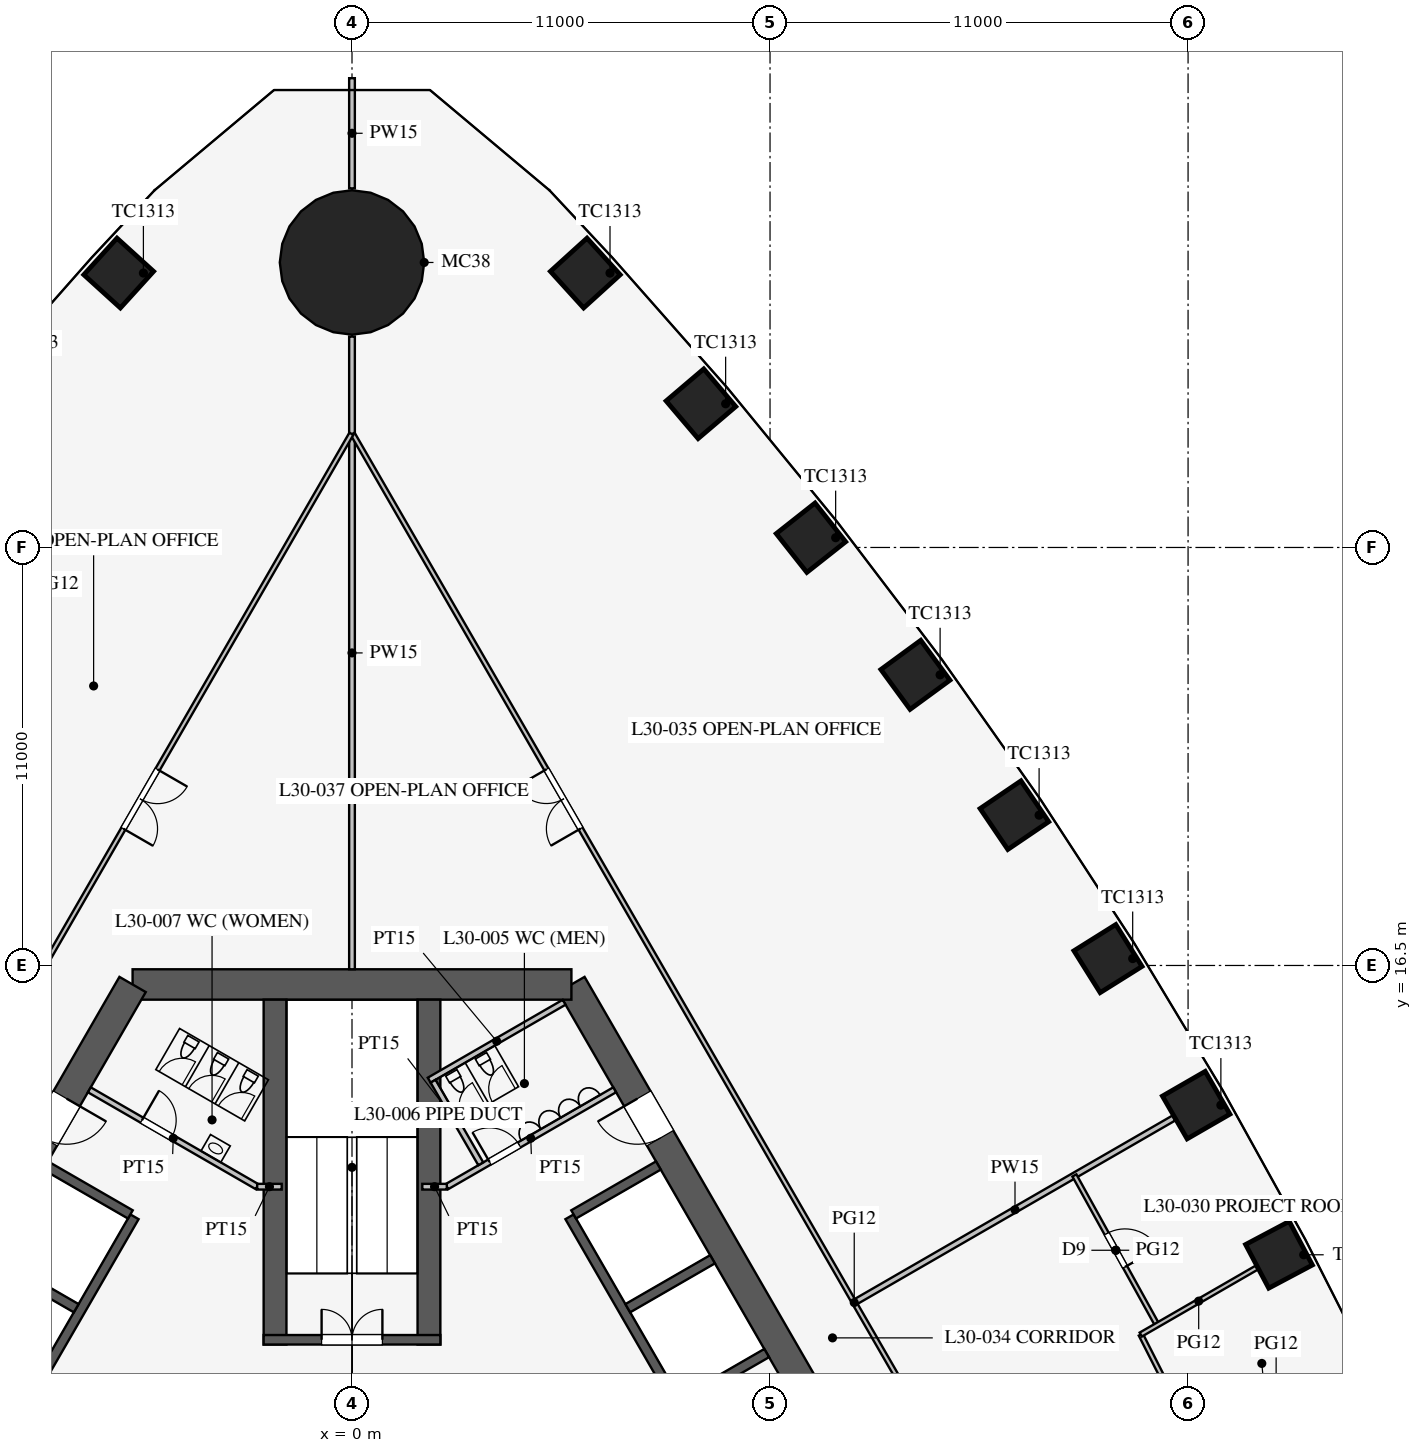
"""IFC4 building model, lengths in metres.
Left out: names, types, materials, properties, quantities, classifications, styles, units other than length and angle.
Written with IfcOpenShell. Run it as: python <this file> out.ifc"""

import sys

from ifc_helpers import new_model, si_unit, direction, frame, frame_2d, origin, origin_2d, place, context, subcontext, project, spatial, rectangle, circle, extrude, element, fill, save


model = new_model("IFC4")
c1 = context("Model", 3, precision=1e-05, world=origin(), true_north=direction((0.0, 1.0)))
c2 = subcontext(c1, "Body", "Model", "MODEL_VIEW")
j1 = project(units=[si_unit("LENGTHUNIT", "METRE"), si_unit("PLANEANGLEUNIT", "RADIAN")], contexts=[c1])
p1 = place(None, origin())
s1 = spatial("IfcSite", under=j1, at=p1, CompositionType="ELEMENT")
p2 = place(p1, origin())
s2 = spatial("IfcBuilding", under=s1, at=p2, CompositionType="ELEMENT")
p3 = place(p2, frame((0.0, 0.0, 132.5)))
s3 = spatial("IfcBuildingStorey", under=s2, at=p3, CompositionType="ELEMENT", Elevation=132.5)
for number, where, z_axis, x_axis in (
    (1, (24.393, 8.887, 0.0), (0.0, 0.0, 1.0), (-0.468, 0.883, 0.0)),
    (2, (22.213, 12.825, 0.0), (0.0, 0.0, 1.0), (-0.5, 0.866, 0.0)),
    (3, (19.893, 16.681, 0.0), (0.0, 0.0, 1.0), (-0.531, 0.847, 0.0)),
    (4, (17.43, 20.456, 0.0), (0.0, 0.0, 1.0), (-0.561, 0.828, 0.0)),
    (5, (14.825, 24.148, 0.0), (0.0, 0.0, 1.0), (-0.591, 0.807, 0.0)),
    (6, (12.077, 27.757, 0.0), (0.0, 0.0, 1.0), (-0.62, 0.785, 0.0)),
    (7, (9.182, 31.282, 0.0), (0.0, 0.0, 1.0), (-0.648, 0.762, 0.0)),
    (8, (6.139, 34.721, 0.0), (0.0, 0.0, 1.0), (-0.672, 0.74, 0.0)),
    (9, (-6.139, 34.721, 0.0), (0.0, 0.0, 1.0), (-0.672, -0.74, 0.0)),
):
    element("IfcColumn", number, at=place(p3, frame(where, z_axis=z_axis, x_axis=x_axis)), inside=s3, PredefinedType="COLUMN", context=c2, shape_type="SweptSolid", body=[
        extrude(rectangle(XDim=1.3, YDim=1.3, at=origin_2d()), origin(), (0.0, 0.0, 1.0), 4.2),
    ])
p4 = place(p3, frame((0.0, 35.0, 0.0), z_axis=(0.0, 0.0, 1.0), x_axis=(1.0, 0.0, 0.0)))
e10 = element("IfcColumn", 10, at=p4, inside=s3, PredefinedType="COLUMN", context=c2, shape_type="SweptSolid", body=[
    extrude(circle(Radius=1.9, at=origin_2d()), origin(), (0.0, 0.0, 1.0), 4.2),
])
p5 = place(p3, frame((16.743, -3.0, 0.0), z_axis=(0.0, 0.0, 1.0), x_axis=(-0.500002442456, 0.866023993627, 0.0)))
e11 = element("IfcWall", 11, at=p5, inside=s3, PredefinedType="SHEAR", context=c2, shape_type="SweptSolid", body=[
    extrude(rectangle(XDim=21.939, YDim=0.8, at=frame_2d((10.97, 0.0))), origin(), (0.0, 0.0, 1.0), 4.2),
])
p6 = place(p5, frame((17.27, 0.0, 0.0)))
e12 = element("IfcOpeningElement", 12, at=p6, cuts=e11, PredefinedType="OPENING", context=c2, shape_type="SweptSolid", body=[
    extrude(rectangle(XDim=1.2, YDim=2.1, at=frame_2d((0.6, 1.05))), frame((0.0, 0.41, 0.0), z_axis=(0.0, -1.0, 0.0), x_axis=(1.0, 0.0, 0.0)), (0.0, 0.0, 1.0), 0.82),
])
p7 = place(p5, frame((3.47, 0.0, 0.0)))
e13 = element("IfcOpeningElement", 13, at=p7, cuts=e11, PredefinedType="OPENING", context=c2, shape_type="SweptSolid", body=[
    extrude(rectangle(XDim=1.2, YDim=2.1, at=frame_2d((0.6, 1.05))), frame((0.0, 0.41, 0.0), z_axis=(0.0, -1.0, 0.0), x_axis=(1.0, 0.0, 0.0)), (0.0, 0.0, 1.0), 0.82),
])
p8 = place(p3, frame((5.773, 16.0, 0.0), z_axis=(0.0, 0.0, 1.0), x_axis=(-1.0, 0.0, 0.0)))
e14 = element("IfcWall", 14, at=p8, inside=s3, PredefinedType="SHEAR", context=c2, shape_type="SweptSolid", body=[
    extrude(rectangle(XDim=11.547, YDim=0.8, at=frame_2d((5.773, 0.0))), origin(), (0.0, 0.0, 1.0), 4.2),
])
p9 = place(p3, frame((-5.773, 16.0, 0.0), z_axis=(0.0, 0.0, 1.0), x_axis=(-0.500002442456, -0.866023993627, 0.0)))
e15 = element("IfcWall", 15, at=p9, inside=s3, PredefinedType="SHEAR", context=c2, shape_type="SweptSolid", body=[
    extrude(rectangle(XDim=21.939, YDim=0.8, at=frame_2d((10.97, 0.0))), origin(), (0.0, 0.0, 1.0), 4.2),
])
p10 = place(p9, frame((17.27, 0.0, 0.0)))
e16 = element("IfcOpeningElement", 16, at=p10, cuts=e15, PredefinedType="OPENING", context=c2, shape_type="SweptSolid", body=[
    extrude(rectangle(XDim=1.2, YDim=2.1, at=frame_2d((0.6, 1.05))), frame((0.0, 0.41, 0.0), z_axis=(0.0, -1.0, 0.0), x_axis=(1.0, 0.0, 0.0)), (0.0, 0.0, 1.0), 0.82),
])
p11 = place(p9, frame((3.47, 0.0, 0.0)))
e17 = element("IfcOpeningElement", 17, at=p11, cuts=e15, PredefinedType="OPENING", context=c2, shape_type="SweptSolid", body=[
    extrude(rectangle(XDim=1.2, YDim=2.1, at=frame_2d((0.6, 1.05))), frame((0.0, 0.41, 0.0), z_axis=(0.0, -1.0, 0.0), x_axis=(1.0, 0.0, 0.0)), (0.0, 0.0, 1.0), 0.82),
])
p12 = place(p3, frame((11.424, 0.014, 0.0), z_axis=(0.0, 0.0, 1.0), x_axis=(-0.500001763848, 0.866024385424, 0.0)))
e18 = element("IfcWall", 18, at=p12, inside=s3, PredefinedType="SHEAR", context=c2, shape_type="SweptSolid", body=[
    extrude(rectangle(XDim=11.4, YDim=0.25, at=frame_2d((5.7, 0.0))), origin(), (0.0, 0.0, 1.0), 4.2),
])
p13 = place(p12, frame((0.975, 0.0, 0.0)))
e19 = element("IfcOpeningElement", 19, at=p13, cuts=e18, PredefinedType="OPENING", context=c2, shape_type="SweptSolid", body=[
    extrude(rectangle(XDim=0.9, YDim=2.1, at=frame_2d((0.45, 1.05))), frame((0.0, 0.135, 0.0), z_axis=(0.0, -1.0, 0.0), x_axis=(1.0, 0.0, 0.0)), (0.0, 0.0, 1.0), 0.27),
])
p14 = place(p12, frame((3.825, 0.0, 0.0)))
e20 = element("IfcOpeningElement", 20, at=p14, cuts=e18, PredefinedType="OPENING", context=c2, shape_type="SweptSolid", body=[
    extrude(rectangle(XDim=0.9, YDim=2.1, at=frame_2d((0.45, 1.05))), frame((0.0, 0.135, 0.0), z_axis=(0.0, -1.0, 0.0), x_axis=(1.0, 0.0, 0.0)), (0.0, 0.0, 1.0), 0.27),
])
for number, where, z_axis, x_axis in (
    (21, (8.682, 5.012, 0.0), (0.0, 0.0, 1.0), (0.866, 0.5, 0.0)),
    (22, (7.257, 7.481, 0.0), (0.0, 0.0, 1.0), (0.866, 0.5, 0.0)),
):
    element("IfcWall", number, at=place(p3, frame(where, z_axis=z_axis, x_axis=x_axis)), inside=s3, PredefinedType="SHEAR", context=c2, shape_type="SweptSolid", body=[
        extrude(rectangle(XDim=2.575, YDim=0.25, at=frame_2d((1.288, 0.0))), origin(), (0.0, 0.0, 1.0), 4.2),
    ])
p15 = place(p3, frame((5.832, 9.949, 0.0), z_axis=(0.0, 0.0, 1.0), x_axis=(0.866029291668, 0.499993265928, 0.0)))
e23 = element("IfcWall", 23, at=p15, inside=s3, PredefinedType="SHEAR", context=c2, shape_type="SweptSolid", body=[
    extrude(rectangle(XDim=2.575, YDim=0.25, at=frame_2d((1.288, 0.0))), origin(), (0.0, 0.0, 1.0), 4.2),
])
p16 = place(p3, frame((-5.724, 9.886, 0.0), z_axis=(0.0, 0.0, 1.0), x_axis=(-0.500001763848, -0.866024385424, 0.0)))
e24 = element("IfcWall", 24, at=p16, inside=s3, PredefinedType="SHEAR", context=c2, shape_type="SweptSolid", body=[
    extrude(rectangle(XDim=11.4, YDim=0.25, at=frame_2d((5.7, 0.0))), origin(), (0.0, 0.0, 1.0), 4.2),
])
p17 = place(p16, frame((6.525, 0.0, 0.0)))
e25 = element("IfcOpeningElement", 25, at=p17, cuts=e24, PredefinedType="OPENING", context=c2, shape_type="SweptSolid", body=[
    extrude(rectangle(XDim=1.2, YDim=2.2, at=frame_2d((0.6, 1.1))), frame((0.0, 0.135, 0.0), z_axis=(0.0, -1.0, 0.0), x_axis=(1.0, 0.0, 0.0)), (0.0, 0.0, 1.0), 0.27),
])
p18 = place(p16, frame((9.375, 0.0, 0.0)))
e26 = element("IfcOpeningElement", 26, at=p18, cuts=e24, PredefinedType="OPENING", context=c2, shape_type="SweptSolid", body=[
    extrude(rectangle(XDim=1.2, YDim=2.2, at=frame_2d((0.6, 1.1))), frame((0.0, 0.135, 0.0), z_axis=(0.0, -1.0, 0.0), x_axis=(1.0, 0.0, 0.0)), (0.0, 0.0, 1.0), 0.27),
])
p19 = place(p3, frame((-5.832, 9.949, 0.0), z_axis=(0.0, 0.0, 1.0), x_axis=(-0.866029291668, 0.499993265928, 0.0)))
e27 = element("IfcWall", 27, at=p19, inside=s3, PredefinedType="SHEAR", context=c2, shape_type="SweptSolid", body=[
    extrude(rectangle(XDim=2.575, YDim=0.25, at=frame_2d((1.288, 0.0))), origin(), (0.0, 0.0, 1.0), 4.2),
])
p20 = place(p3, frame((-7.257, 7.481, 0.0), z_axis=(0.0, 0.0, 1.0), x_axis=(-0.866046643894, 0.499963209246, 0.0)))
e28 = element("IfcWall", 28, at=p20, inside=s3, PredefinedType="SHEAR", context=c2, shape_type="SweptSolid", body=[
    extrude(rectangle(XDim=2.575, YDim=0.25, at=frame_2d((1.288, 0.0))), origin(), (0.0, 0.0, 1.0), 4.2),
])
for number, where, z_axis, x_axis in (
    (29, (2.025, 6.525, 0.0), (0.0, 0.0, 1.0), (0.0, 1.0, 0.0)),
    (30, (-2.025, 6.525, 0.0), (0.0, 0.0, 1.0), (0.0, 1.0, 0.0)),
):
    element("IfcWall", number, at=place(p3, frame(where, z_axis=z_axis, x_axis=x_axis)), inside=s3, PredefinedType="SHEAR", context=c2, shape_type="SweptSolid", body=[
        extrude(rectangle(XDim=9.075, YDim=0.6, at=frame_2d((4.538, 0.0))), origin(), (0.0, 0.0, 1.0), 4.2),
    ])
p21 = place(p3, frame((2.325, 6.65, 0.0), z_axis=(0.0, 0.0, 1.0), x_axis=(-1.0, 0.0, 0.0)))
e31 = element("IfcWall", 31, at=p21, inside=s3, PredefinedType="SHEAR", context=c2, shape_type="SweptSolid", body=[
    extrude(rectangle(XDim=4.65, YDim=0.25, at=frame_2d((2.325, 0.0))), origin(), (0.0, 0.0, 1.0), 4.2),
])
p22 = place(p21, frame((1.525, 0.0, 0.0)))
e32 = element("IfcOpeningElement", 32, at=p22, cuts=e31, PredefinedType="OPENING", context=c2, shape_type="SweptSolid", body=[
    extrude(rectangle(XDim=1.6, YDim=2.1, at=frame_2d((0.8, 1.05))), frame((0.0, 0.135, 0.0), z_axis=(0.0, -1.0, 0.0), x_axis=(1.0, 0.0, 0.0)), (0.0, 0.0, 1.0), 0.27),
])
p23 = place(p3, frame((2.495, 10.678, 0.0), z_axis=(0.0, 0.0, 1.0), x_axis=(0.86602216432, 0.500005610874, 0.0)))
e33 = element("IfcWall", 33, at=p23, inside=s3, PredefinedType="PARTITIONING", context=c2, shape_type="SweptSolid", body=[
    extrude(rectangle(XDim=5.1, YDim=0.15, at=frame_2d((2.55, 0.0))), origin(), (0.0, 0.0, 1.0), 4.0),
])
p24 = place(p23, frame((1.3, 0.0, 0.0)))
e34 = element("IfcOpeningElement", 34, at=p24, cuts=e33, PredefinedType="OPENING", context=c2, shape_type="SweptSolid", body=[
    extrude(rectangle(XDim=0.9, YDim=2.1, at=frame_2d((0.45, 1.05))), frame((0.0, 0.085, 0.0), z_axis=(0.0, -1.0, 0.0), x_axis=(1.0, 0.0, 0.0)), (0.0, 0.0, 1.0), 0.17),
])
p25 = place(p3, frame((-2.495, 10.678, 0.0), z_axis=(0.0, 0.0, 1.0), x_axis=(-0.86602216432, 0.500005610874, 0.0)))
e35 = element("IfcWall", 35, at=p25, inside=s3, PredefinedType="PARTITIONING", context=c2, shape_type="SweptSolid", body=[
    extrude(rectangle(XDim=5.1, YDim=0.15, at=frame_2d((2.55, 0.0))), origin(), (0.0, 0.0, 1.0), 4.0),
])
p26 = place(p25, frame((2.6, 0.0, 0.0)))
e36 = element("IfcOpeningElement", 36, at=p26, cuts=e35, PredefinedType="OPENING", context=c2, shape_type="SweptSolid", body=[
    extrude(rectangle(XDim=0.9, YDim=2.1, at=frame_2d((0.45, 1.05))), frame((0.0, 0.085, 0.0), z_axis=(0.0, -1.0, 0.0), x_axis=(1.0, 0.0, 0.0)), (0.0, 0.0, 1.0), 0.17),
])
for number, where, z_axis, x_axis in (
    (37, (2.495, 10.678, 0.0), (0.0, 0.0, 1.0), (-1.0, 0.0, 0.0)),
    (38, (-2.495, 10.678, 0.0), (0.0, 0.0, 1.0), (1.0, 0.0, 0.0)),
):
    element("IfcWall", number, at=place(p3, frame(where, z_axis=z_axis, x_axis=x_axis)), inside=s3, PredefinedType="PARTITIONING", context=c2, shape_type="SweptSolid", body=[
        extrude(rectangle(XDim=0.645, YDim=0.15, at=frame_2d((0.323, 0.0))), origin(), (0.0, 0.0, 1.0), 4.0),
    ])
p27 = place(p3, frame((2.031, 13.482, 0.0), z_axis=(0.0, 0.0, 1.0), x_axis=(0.866050731258, 0.499956128963, 0.0)))
e39 = element("IfcWall", 39, at=p27, inside=s3, PredefinedType="PARTITIONING", context=c2, shape_type="SweptSolid", body=[
    extrude(rectangle(XDim=4.1, YDim=0.15, at=frame_2d((2.05, 0.0))), origin(), (0.0, 0.0, 1.0), 4.0),
])
p28 = place(p3, frame((3.389, 11.281, 0.0), z_axis=(0.0, 0.0, 1.0), x_axis=(-0.499989096993, 0.866031698547, 0.0)))
e40 = element("IfcWall", 40, at=p28, inside=s3, PredefinedType="PARTITIONING", context=c2, shape_type="SweptSolid", body=[
    extrude(rectangle(XDim=2.51, YDim=0.15, at=frame_2d((1.255, 0.0))), origin(), (0.0, 0.0, 1.0), 4.0),
])
p29 = place(p3, frame((0.0, 16.4, 0.0), z_axis=(0.0, 0.0, 1.0), x_axis=(0.0, 1.0, 0.0)))
e41 = element("IfcWall", 41, at=p29, inside=s3, PredefinedType="PARTITIONING", context=c2, shape_type="SweptSolid", body=[
    extrude(rectangle(XDim=16.65, YDim=0.15, at=frame_2d((8.325, 0.0))), origin(), (0.0, 0.0, 1.0), 2.3),
])
p30 = place(p3, frame((0.0, 36.95, 0.0), z_axis=(0.0, 0.0, 1.0), x_axis=(0.0, 1.0, 0.0)))
e42 = element("IfcWall", 42, at=p30, inside=s3, PredefinedType="PARTITIONING", context=c2, shape_type="SweptSolid", body=[
    extrude(rectangle(XDim=2.899, YDim=0.15, at=frame_2d((1.45, 0.0))), origin(), (0.0, 0.0, 1.0), 2.3),
])
p31 = place(p3, frame((13.268, 7.66, 0.0), z_axis=(0.0, 0.0, 1.0), x_axis=(0.866015788683, 0.500016653474, 0.0)))
e43 = element("IfcWall", 43, at=p31, inside=s3, PredefinedType="PARTITIONING", context=c2, shape_type="SweptSolid", body=[
    extrude(rectangle(XDim=9.65, YDim=0.15, at=frame_2d((4.825, 0.0))), origin(), (0.0, 0.0, 1.0), 3.2),
])
p32 = place(p3, frame((26.415, -15.231, 0.0), z_axis=(0.0, 0.0, 1.0), x_axis=(-0.50000091641, 0.866024874695, 0.0)))
e44 = element("IfcWall", 44, at=p32, inside=s3, PredefinedType="PARTITIONING", context=c2, shape_type="SweptSolid", body=[
    extrude(rectangle(XDim=52.796, YDim=0.12, at=frame_2d((26.398, 0.0))), origin(), (0.0, 0.0, 1.0), 2.9),
])
p33 = place(p32, frame((10.2, 0.0, 0.15)))
e45 = element("IfcOpeningElement", 45, at=p33, cuts=e44, PredefinedType="OPENING", context=c2, shape_type="SweptSolid", body=[
    extrude(rectangle(XDim=1.8, YDim=2.1, at=frame_2d((0.9, 1.05))), frame((0.0, 0.07, 0.0), z_axis=(0.0, -1.0, 0.0), x_axis=(1.0, 0.0, 0.0)), (0.0, 0.0, 1.0), 0.14),
])
p34 = place(p32, frame((40.8, 0.0, 0.15)))
e46 = element("IfcOpeningElement", 46, at=p34, cuts=e44, PredefinedType="OPENING", context=c2, shape_type="SweptSolid", body=[
    extrude(rectangle(XDim=1.8, YDim=2.1, at=frame_2d((0.9, 1.05))), frame((0.0, 0.07, 0.0), z_axis=(0.0, -1.0, 0.0), x_axis=(1.0, 0.0, 0.0)), (0.0, 0.0, 1.0), 0.14),
])
p35 = place(p3, frame((21.189, 7.037, 0.0), z_axis=(0.0, 0.0, 1.0), x_axis=(-0.484292898211, 0.874905931368, 0.0)))
e47 = element("IfcWall", 47, at=p35, inside=s3, PredefinedType="PARTITIONING", context=c2, shape_type="SweptSolid", body=[
    extrude(rectangle(XDim=4.501, YDim=0.12, at=frame_2d((2.25, 0.0))), origin(), (0.0, 0.0, 1.0), 2.9),
])
p36 = place(p35, frame((1.75, 0.0, 0.15)))
e48 = element("IfcOpeningElement", 48, at=p36, cuts=e47, PredefinedType="OPENING", context=c2, shape_type="SweptSolid", body=[
    extrude(rectangle(XDim=1.0, YDim=2.1, at=frame_2d((0.5, 1.05))), frame((0.0, 0.07, 0.0), z_axis=(0.0, -1.0, 0.0), x_axis=(1.0, 0.0, 0.0)), (0.0, 0.0, 1.0), 0.14),
])
p37 = place(p3, frame((22.795, 2.768, 0.0), z_axis=(0.0, 0.0, 1.0), x_axis=(-0.452471679136, 0.891778772779, 0.0)))
e49 = element("IfcWall", 49, at=p37, inside=s3, PredefinedType="PARTITIONING", context=c2, shape_type="SweptSolid", body=[
    extrude(rectangle(XDim=4.507, YDim=0.12, at=frame_2d((2.253, 0.0))), origin(), (0.0, 0.0, 1.0), 2.9),
])
p38 = place(p37, frame((1.75, 0.0, 0.15)))
e50 = element("IfcOpeningElement", 50, at=p38, cuts=e49, PredefinedType="OPENING", context=c2, shape_type="SweptSolid", body=[
    extrude(rectangle(XDim=1.0, YDim=2.1, at=frame_2d((0.5, 1.05))), frame((0.0, 0.07, 0.0), z_axis=(0.0, -1.0, 0.0), x_axis=(1.0, 0.0, 0.0)), (0.0, 0.0, 1.0), 0.14),
])
p39 = place(p3, frame((20.756, 6.787, 0.0), z_axis=(0.0, 0.0, 1.0), x_axis=(0.866027308682, 0.499996700606, 0.0)))
e51 = element("IfcWall", 51, at=p39, inside=s3, PredefinedType="PARTITIONING", context=c2, shape_type="SweptSolid", body=[
    extrude(rectangle(XDim=3.519, YDim=0.12, at=frame_2d((1.76, 0.0))), origin(), (0.0, 0.0, 1.0), 2.9),
])
p40 = place(p3, frame((-0.016, 30.491, 0.0), z_axis=(0.0, 0.0, 1.0), x_axis=(-0.50000091641, -0.866024874695, 0.0)))
e52 = element("IfcWall", 52, at=p40, inside=s3, PredefinedType="PARTITIONING", context=c2, shape_type="SweptSolid", body=[
    extrude(rectangle(XDim=52.796, YDim=0.12, at=frame_2d((26.398, 0.0))), origin(), (0.0, 0.0, 1.0), 2.9),
])
p41 = place(p40, frame((10.2, 0.0, 0.15)))
e53 = element("IfcOpeningElement", 53, at=p41, cuts=e52, PredefinedType="OPENING", context=c2, shape_type="SweptSolid", body=[
    extrude(rectangle(XDim=1.8, YDim=2.1, at=frame_2d((0.9, 1.05))), frame((0.0, 0.07, 0.0), z_axis=(0.0, -1.0, 0.0), x_axis=(1.0, 0.0, 0.0)), (0.0, 0.0, 1.0), 0.14),
])
p42 = place(p40, frame((40.8, 0.0, 0.15)))
e54 = element("IfcOpeningElement", 54, at=p42, cuts=e52, PredefinedType="OPENING", context=c2, shape_type="SweptSolid", body=[
    extrude(rectangle(XDim=1.8, YDim=2.1, at=frame_2d((0.9, 1.05))), frame((0.0, 0.07, 0.0), z_axis=(0.0, -1.0, 0.0), x_axis=(1.0, 0.0, 0.0)), (0.0, 0.0, 1.0), 0.14),
])
p43 = place(p24, origin())
e55 = element("IfcDoor", 55, at=p43, inside=s3, OperationType="SINGLE_SWING_LEFT", PredefinedType="DOOR", context=c2, shape_type="SweptSolid", body=[
    extrude(rectangle(XDim=0.9, YDim=2.1, at=frame_2d((0.45, 1.05))), frame((0.0, 0.025, 0.0), z_axis=(0.0, -1.0, 0.0), x_axis=(1.0, 0.0, 0.0)), (0.0, 0.0, 1.0), 0.05),
])
fill(e34, e55)
p44 = place(p26, frame((0.9, 0.0, 0.0), z_axis=(0.0, 0.0, 1.0), x_axis=(-1.0, 0.0, 0.0)))
e56 = element("IfcDoor", 56, at=p44, inside=s3, OperationType="SINGLE_SWING_LEFT", PredefinedType="DOOR", context=c2, shape_type="SweptSolid", body=[
    extrude(rectangle(XDim=0.9, YDim=2.1, at=frame_2d((0.45, 1.05))), frame((0.0, 0.025, 0.0), z_axis=(0.0, -1.0, 0.0), x_axis=(1.0, 0.0, 0.0)), (0.0, 0.0, 1.0), 0.05),
])
fill(e36, e56)
p45 = place(p22, frame((1.6, 0.0, 0.0), z_axis=(0.0, 0.0, 1.0), x_axis=(-1.0, 0.0, 0.0)))
e57 = element("IfcDoor", 57, at=p45, inside=s3, OperationType="DOUBLE_DOOR_SINGLE_SWING", PredefinedType="DOOR", context=c2, shape_type="SweptSolid", body=[
    extrude(rectangle(XDim=1.6, YDim=2.1, at=frame_2d((0.8, 1.05))), frame((0.0, 0.025, 0.0), z_axis=(0.0, -1.0, 0.0), x_axis=(1.0, 0.0, 0.0)), (0.0, 0.0, 1.0), 0.05),
])
fill(e32, e57)
p46 = place(p6, origin())
e58 = element("IfcDoor", 58, at=p46, inside=s3, OperationType="SINGLE_SWING_RIGHT", PredefinedType="DOOR", context=c2, shape_type="SweptSolid", body=[
    extrude(rectangle(XDim=1.2, YDim=2.1, at=frame_2d((0.6, 1.05))), frame((0.0, 0.025, 0.0), z_axis=(0.0, -1.0, 0.0), x_axis=(1.0, 0.0, 0.0)), (0.0, 0.0, 1.0), 0.05),
])
fill(e12, e58)
p47 = place(p11, origin())
e59 = element("IfcDoor", 59, at=p47, inside=s3, OperationType="SINGLE_SWING_LEFT", PredefinedType="DOOR", context=c2, shape_type="SweptSolid", body=[
    extrude(rectangle(XDim=1.2, YDim=2.1, at=frame_2d((0.6, 1.05))), frame((0.0, 0.025, 0.0), z_axis=(0.0, -1.0, 0.0), x_axis=(1.0, 0.0, 0.0)), (0.0, 0.0, 1.0), 0.05),
])
fill(e17, e59)
p48 = place(p36, frame((1.0, 0.0, 0.0), z_axis=(0.0, 0.0, 1.0), x_axis=(-1.0, 0.0, 0.0)))
e60 = element("IfcDoor", 60, at=p48, inside=s3, OperationType="SINGLE_SWING_RIGHT", PredefinedType="DOOR", context=c2, shape_type="SweptSolid", body=[
    extrude(rectangle(XDim=1.0, YDim=2.1, at=frame_2d((0.5, 1.05))), frame((0.0, 0.025, 0.0), z_axis=(0.0, -1.0, 0.0), x_axis=(1.0, 0.0, 0.0)), (0.0, 0.0, 1.0), 0.05),
])
fill(e48, e60)
p49 = place(p34, origin())
e61 = element("IfcDoor", 61, at=p49, inside=s3, OperationType="DOUBLE_DOOR_SINGLE_SWING", PredefinedType="DOOR", context=c2, shape_type="SweptSolid", body=[
    extrude(rectangle(XDim=1.8, YDim=2.1, at=frame_2d((0.9, 1.05))), frame((0.0, 0.025, 0.0), z_axis=(0.0, -1.0, 0.0), x_axis=(1.0, 0.0, 0.0)), (0.0, 0.0, 1.0), 0.05),
])
fill(e46, e61)
p50 = place(p41, origin())
e62 = element("IfcDoor", 62, at=p50, inside=s3, OperationType="DOUBLE_DOOR_SINGLE_SWING", PredefinedType="DOOR", context=c2, shape_type="SweptSolid", body=[
    extrude(rectangle(XDim=1.8, YDim=2.1, at=frame_2d((0.9, 1.05))), frame((0.0, 0.025, 0.0), z_axis=(0.0, -1.0, 0.0), x_axis=(1.0, 0.0, 0.0)), (0.0, 0.0, 1.0), 0.05),
])
fill(e53, e62)
save(model, sys.argv[1])
